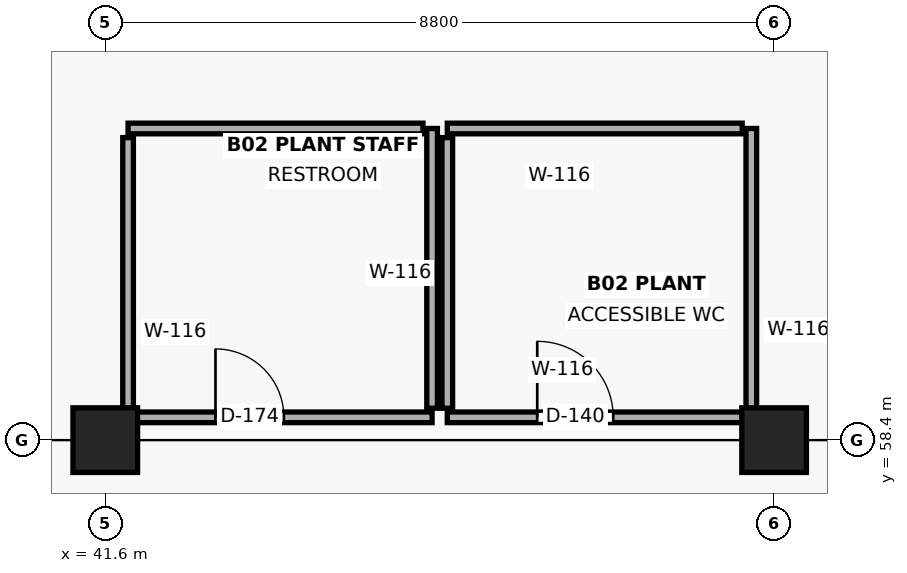
"""IFC4 building model, lengths in metres.
Left out: names, types, materials, properties, quantities, classifications, styles, units other than length and angle.
Written with IfcOpenShell. Run it as: python <this file> out.ifc"""

import sys

from ifc_helpers import new_model, si_unit, direction, frame, frame_2d, origin, origin_2d, place, context, subcontext, project, spatial, rectangle, extrude, element, fill, save


model = new_model("IFC4")
c1 = context("Model", 3, precision=1e-05, world=origin(), true_north=direction((0.0, 1.0)))
c2 = subcontext(c1, "Body", "Model", "MODEL_VIEW")
j1 = project(units=[si_unit("LENGTHUNIT", "METRE"), si_unit("PLANEANGLEUNIT", "RADIAN")], contexts=[c1])
p1 = place(None, origin())
s1 = spatial("IfcSite", under=j1, at=p1, CompositionType="ELEMENT")
p2 = place(p1, origin())
s2 = spatial("IfcBuilding", under=s1, at=p2, CompositionType="ELEMENT")
p3 = place(p2, frame((0.0, 0.0, -9.0)))
s3 = spatial("IfcBuildingStorey", under=s2, at=p3, CompositionType="ELEMENT", Elevation=-9.0)
for number, where, z_axis, x_axis in (
    (1, (41.6, 58.4, 0.0), (0.0, 0.0, 1.0), (1.0, 0.0, 0.0)),
    (2, (50.4, 58.4, 0.0), (0.0, 0.0, 1.0), (1.0, 0.0, 0.0)),
):
    element("IfcColumn", number, at=place(p3, frame(where, z_axis=z_axis, x_axis=x_axis)), inside=s3, PredefinedType="COLUMN", context=c2, shape_type="SweptSolid", body=[
        extrude(rectangle(XDim=0.85, YDim=0.85, at=origin_2d()), origin(), (0.0, 0.0, 1.0), 4.5),
    ])
p4 = place(p3, frame((41.92, 58.7, 0.0), z_axis=(0.0, 0.0, 1.0), x_axis=(1.0, 0.0, 0.0)))
e3 = element("IfcWall", 3, at=p4, inside=s3, PredefinedType="PLUMBINGWALL", context=c2, shape_type="SweptSolid", body=[
    extrude(rectangle(XDim=3.98, YDim=0.14, at=frame_2d((1.99, 0.0))), origin(), (0.0, 0.0, 1.0), 4.17),
])
p5 = place(p4, frame((1.13, 0.0, 0.0)))
e4 = element("IfcOpeningElement", 4, at=p5, cuts=e3, PredefinedType="OPENING", context=c2, shape_type="SweptSolid", body=[
    extrude(rectangle(XDim=0.9, YDim=2.15, at=frame_2d((0.45, 1.075))), frame((0.0, 0.082, 0.0), z_axis=(0.0, -1.0, 0.0), x_axis=(1.0, 0.0, 0.0)), (0.0, 0.0, 1.0), 0.164),
])
p6 = place(p3, frame((45.9, 58.82, 0.0), z_axis=(0.0, 0.0, 1.0), x_axis=(0.0, 1.0, 0.0)))
e5 = element("IfcWall", 5, at=p6, inside=s3, PredefinedType="PLUMBINGWALL", context=c2, shape_type="SweptSolid", body=[
    extrude(rectangle(XDim=3.68, YDim=0.14, at=frame_2d((1.84, 0.0))), origin(), (0.0, 0.0, 1.0), 4.17),
])
p7 = place(p3, frame((45.78, 62.5, 0.0), z_axis=(0.0, 0.0, 1.0), x_axis=(-1.0, 0.0, 0.0)))
e6 = element("IfcWall", 6, at=p7, inside=s3, PredefinedType="PLUMBINGWALL", context=c2, shape_type="SweptSolid", body=[
    extrude(rectangle(XDim=3.88, YDim=0.14, at=frame_2d((1.94, 0.0))), origin(), (0.0, 0.0, 1.0), 3.57),
])
p8 = place(p3, frame((41.9, 62.38, 0.0), z_axis=(0.0, 0.0, 1.0), x_axis=(0.0, -1.0, 0.0)))
e7 = element("IfcWall", 7, at=p8, inside=s3, PredefinedType="PLUMBINGWALL", context=c2, shape_type="SweptSolid", body=[
    extrude(rectangle(XDim=3.56, YDim=0.14, at=frame_2d((1.78, 0.0))), origin(), (0.0, 0.0, 1.0), 4.17),
])
p9 = place(p3, frame((46.1, 58.7, 0.0), z_axis=(0.0, 0.0, 1.0), x_axis=(1.0, 0.0, 0.0)))
e8 = element("IfcWall", 8, at=p9, inside=s3, PredefinedType="PLUMBINGWALL", context=c2, shape_type="SweptSolid", body=[
    extrude(rectangle(XDim=3.98, YDim=0.14, at=frame_2d((1.99, 0.0))), origin(), (0.0, 0.0, 1.0), 4.17),
])
p10 = place(p9, frame((1.183, 0.0, 0.0)))
e9 = element("IfcOpeningElement", 9, at=p10, cuts=e8, PredefinedType="OPENING", context=c2, shape_type="SweptSolid", body=[
    extrude(rectangle(XDim=1.0, YDim=2.15, at=frame_2d((0.5, 1.075))), frame((0.0, 0.082, 0.0), z_axis=(0.0, -1.0, 0.0), x_axis=(1.0, 0.0, 0.0)), (0.0, 0.0, 1.0), 0.164),
])
p11 = place(p3, frame((50.1, 58.82, 0.0), z_axis=(0.0, 0.0, 1.0), x_axis=(0.0, 1.0, 0.0)))
e10 = element("IfcWall", 10, at=p11, inside=s3, PredefinedType="PLUMBINGWALL", context=c2, shape_type="SweptSolid", body=[
    extrude(rectangle(XDim=3.68, YDim=0.14, at=frame_2d((1.84, 0.0))), origin(), (0.0, 0.0, 1.0), 4.17),
])
p12 = place(p3, frame((49.98, 62.5, 0.0), z_axis=(0.0, 0.0, 1.0), x_axis=(-1.0, 0.0, 0.0)))
e11 = element("IfcWall", 11, at=p12, inside=s3, PredefinedType="PLUMBINGWALL", context=c2, shape_type="SweptSolid", body=[
    extrude(rectangle(XDim=3.88, YDim=0.14, at=frame_2d((1.94, 0.0))), origin(), (0.0, 0.0, 1.0), 3.57),
])
p13 = place(p3, frame((46.1, 62.38, 0.0), z_axis=(0.0, 0.0, 1.0), x_axis=(0.0, -1.0, 0.0)))
e12 = element("IfcWall", 12, at=p13, inside=s3, PredefinedType="PLUMBINGWALL", context=c2, shape_type="SweptSolid", body=[
    extrude(rectangle(XDim=3.56, YDim=0.14, at=frame_2d((1.78, 0.0))), origin(), (0.0, 0.0, 1.0), 4.17),
])
p14 = place(p5, origin())
e13 = element("IfcDoor", 13, at=p14, inside=s3, OperationType="SINGLE_SWING_LEFT", PredefinedType="DOOR", context=c2, shape_type="SweptSolid", body=[
    extrude(rectangle(XDim=0.9, YDim=2.15, at=frame_2d((0.45, 1.075))), frame((0.0, 0.025, 0.0), z_axis=(0.0, -1.0, 0.0), x_axis=(1.0, 0.0, 0.0)), (0.0, 0.0, 1.0), 0.05),
])
fill(e4, e13)
p15 = place(p10, origin())
e14 = element("IfcDoor", 14, at=p15, inside=s3, OperationType="SINGLE_SWING_LEFT", PredefinedType="DOOR", context=c2, shape_type="SweptSolid", body=[
    extrude(rectangle(XDim=1.0, YDim=2.15, at=frame_2d((0.5, 1.075))), frame((0.0, 0.025, 0.0), z_axis=(0.0, -1.0, 0.0), x_axis=(1.0, 0.0, 0.0)), (0.0, 0.0, 1.0), 0.05),
])
fill(e9, e14)
save(model, sys.argv[1])
